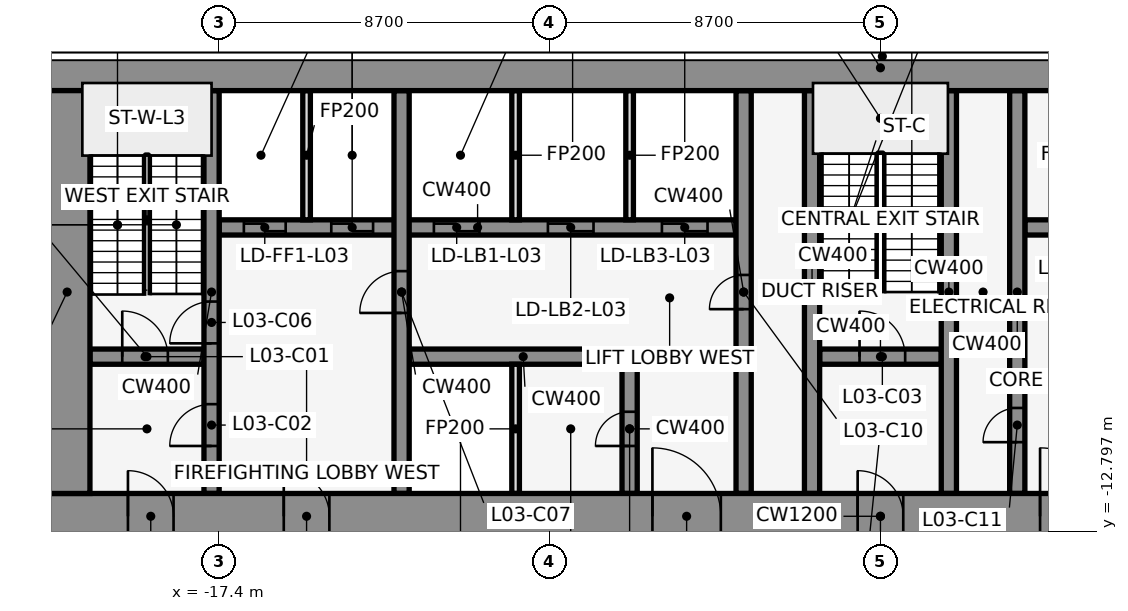
"""IFC4 building model, lengths in metres.
Left out: names, types, materials, properties, quantities, classifications, styles, units other than length and angle.
Written with IfcOpenShell. Run it as: python <this file> out.ifc"""

import sys

from ifc_helpers import new_model, si_unit, direction, frame, frame_2d, origin, place, context, subcontext, project, spatial, rectangle, extrude, element, fill, save


model = new_model("IFC4")
c1 = context("Model", 3, precision=1e-05, world=origin(), true_north=direction((0.0, 1.0)))
c2 = subcontext(c1, "Body", "Model", "MODEL_VIEW")
j1 = project(units=[si_unit("LENGTHUNIT", "METRE"), si_unit("PLANEANGLEUNIT", "RADIAN")], contexts=[c1])
p1 = place(None, origin())
s1 = spatial("IfcSite", under=j1, at=p1, CompositionType="ELEMENT")
p2 = place(p1, origin())
s2 = spatial("IfcBuilding", under=s1, at=p2, CompositionType="ELEMENT")
p3 = place(p2, frame((0.0, 0.0, 20.0)))
s3 = spatial("IfcBuildingStorey", under=s2, at=p3, CompositionType="ELEMENT", Elevation=20.0)
p4 = place(p3, frame((-20.8, -8.2, 0.0), z_axis=(0.0, 0.0, 1.0), x_axis=(1.0, 0.0, 0.0)))
e1 = element("IfcWall", 1, at=p4, inside=s3, PredefinedType="SHEAR", context=c2, shape_type="SweptSolid", body=[
    extrude(rectangle(XDim=3.0, YDim=0.4, at=frame_2d((1.5, 0.0))), origin(), (0.0, 0.0, 1.0), 5.0),
])
p5 = place(p4, frame((0.85, 0.0, 0.0)))
e2 = element("IfcOpeningElement", 2, at=p5, cuts=e1, PredefinedType="OPENING", context=c2, shape_type="SweptSolid", body=[
    extrude(rectangle(XDim=1.2, YDim=2.1, at=frame_2d((0.6, 1.05))), frame((0.0, 0.212, 0.0), z_axis=(0.0, -1.0, 0.0), x_axis=(1.0, 0.0, 0.0)), (0.0, 0.0, 1.0), 0.424),
])
p6 = place(p3, frame((-12.4, -8.2, 0.0), z_axis=(0.0, 0.0, 1.0), x_axis=(1.0, 0.0, 0.0)))
e3 = element("IfcWall", 3, at=p6, inside=s3, PredefinedType="SHEAR", context=c2, shape_type="SweptSolid", body=[
    extrude(rectangle(XDim=6.0, YDim=0.4, at=frame_2d((3.0, 0.0))), origin(), (0.0, 0.0, 1.0), 5.0),
])
p7 = place(p3, frame((-1.6, -8.2, 0.0), z_axis=(0.0, 0.0, 1.0), x_axis=(1.0, 0.0, 0.0)))
e4 = element("IfcWall", 4, at=p7, inside=s3, PredefinedType="SHEAR", context=c2, shape_type="SweptSolid", body=[
    extrude(rectangle(XDim=3.2, YDim=0.4, at=frame_2d((1.6, 0.0))), origin(), (0.0, 0.0, 1.0), 5.0),
])
p8 = place(p7, frame((1.05, 0.0, 0.0)))
e5 = element("IfcOpeningElement", 5, at=p8, cuts=e4, PredefinedType="OPENING", context=c2, shape_type="SweptSolid", body=[
    extrude(rectangle(XDim=1.2, YDim=2.1, at=frame_2d((0.6, 1.05))), frame((0.0, 0.212, 0.0), z_axis=(0.0, -1.0, 0.0), x_axis=(1.0, 0.0, 0.0)), (0.0, 0.0, 1.0), 0.424),
])
p9 = place(p3, frame((-17.4, -4.8, 0.0), z_axis=(0.0, 0.0, 1.0), x_axis=(1.0, 0.0, 0.0)))
e6 = element("IfcWall", 6, at=p9, inside=s3, PredefinedType="SHEAR", context=c2, shape_type="SweptSolid", body=[
    extrude(rectangle(XDim=13.6, YDim=0.4, at=frame_2d((6.8, 0.0))), origin(), (0.0, 0.0, 1.0), 5.0),
])
p10 = place(p9, frame((0.65, 0.0, 0.0)))
e7 = element("IfcOpeningElement", 7, at=p10, cuts=e6, PredefinedType="OPENING", context=c2, shape_type="SweptSolid", body=[
    extrude(rectangle(XDim=1.1, YDim=2.1, at=frame_2d((0.55, 1.05))), frame((0.0, 0.212, 0.0), z_axis=(0.0, -1.0, 0.0), x_axis=(1.0, 0.0, 0.0)), (0.0, 0.0, 1.0), 0.424),
])
p11 = place(p9, frame((2.95, 0.0, 0.0)))
e8 = element("IfcOpeningElement", 8, at=p11, cuts=e6, PredefinedType="OPENING", context=c2, shape_type="SweptSolid", body=[
    extrude(rectangle(XDim=1.1, YDim=2.1, at=frame_2d((0.55, 1.05))), frame((0.0, 0.212, 0.0), z_axis=(0.0, -1.0, 0.0), x_axis=(1.0, 0.0, 0.0)), (0.0, 0.0, 1.0), 0.424),
])
p12 = place(p9, frame((5.65, 0.0, 0.0)))
e9 = element("IfcOpeningElement", 9, at=p12, cuts=e6, PredefinedType="OPENING", context=c2, shape_type="SweptSolid", body=[
    extrude(rectangle(XDim=1.2, YDim=2.1, at=frame_2d((0.6, 1.05))), frame((0.0, 0.212, 0.0), z_axis=(0.0, -1.0, 0.0), x_axis=(1.0, 0.0, 0.0)), (0.0, 0.0, 1.0), 0.424),
])
p13 = place(p9, frame((8.65, 0.0, 0.0)))
e10 = element("IfcOpeningElement", 10, at=p13, cuts=e6, PredefinedType="OPENING", context=c2, shape_type="SweptSolid", body=[
    extrude(rectangle(XDim=1.2, YDim=2.1, at=frame_2d((0.6, 1.05))), frame((0.0, 0.212, 0.0), z_axis=(0.0, -1.0, 0.0), x_axis=(1.0, 0.0, 0.0)), (0.0, 0.0, 1.0), 0.424),
])
p14 = place(p9, frame((11.65, 0.0, 0.0)))
e11 = element("IfcOpeningElement", 11, at=p14, cuts=e6, PredefinedType="OPENING", context=c2, shape_type="SweptSolid", body=[
    extrude(rectangle(XDim=1.2, YDim=2.1, at=frame_2d((0.6, 1.05))), frame((0.0, 0.212, 0.0), z_axis=(0.0, -1.0, 0.0), x_axis=(1.0, 0.0, 0.0)), (0.0, 0.0, 1.0), 0.424),
])
p15 = place(p3, frame((3.8, -4.8, 0.0), z_axis=(0.0, 0.0, 1.0), x_axis=(1.0, 0.0, 0.0)))
e12 = element("IfcWall", 12, at=p15, inside=s3, PredefinedType="SHEAR", context=c2, shape_type="SweptSolid", body=[
    extrude(rectangle(XDim=13.6, YDim=0.4, at=frame_2d((6.8, 0.0))), origin(), (0.0, 0.0, 1.0), 5.0),
])
p16 = place(p15, frame((9.45, 0.0, 0.0)))
e13 = element("IfcOpeningElement", 13, at=p16, cuts=e12, PredefinedType="OPENING", context=c2, shape_type="SweptSolid", body=[
    extrude(rectangle(XDim=1.1, YDim=2.1, at=frame_2d((0.55, 1.05))), frame((0.0, 0.212, 0.0), z_axis=(0.0, -1.0, 0.0), x_axis=(1.0, 0.0, 0.0)), (0.0, 0.0, 1.0), 0.424),
])
p17 = place(p15, frame((11.85, 0.0, 0.0)))
e14 = element("IfcOpeningElement", 14, at=p17, cuts=e12, PredefinedType="OPENING", context=c2, shape_type="SweptSolid", body=[
    extrude(rectangle(XDim=1.1, YDim=2.1, at=frame_2d((0.55, 1.05))), frame((0.0, 0.212, 0.0), z_axis=(0.0, -1.0, 0.0), x_axis=(1.0, 0.0, 0.0)), (0.0, 0.0, 1.0), 0.424),
])
p18 = place(p15, frame((0.95, 0.0, 0.0)))
e15 = element("IfcOpeningElement", 15, at=p18, cuts=e12, PredefinedType="OPENING", context=c2, shape_type="SweptSolid", body=[
    extrude(rectangle(XDim=0.9, YDim=2.1, at=frame_2d((0.45, 1.05))), frame((0.0, 0.212, 0.0), z_axis=(0.0, -1.0, 0.0), x_axis=(1.0, 0.0, 0.0)), (0.0, 0.0, 1.0), 0.424),
])
p19 = place(p15, frame((3.85, 0.0, 0.0)))
e16 = element("IfcOpeningElement", 16, at=p19, cuts=e12, PredefinedType="OPENING", context=c2, shape_type="SweptSolid", body=[
    extrude(rectangle(XDim=0.9, YDim=2.1, at=frame_2d((0.45, 1.05))), frame((0.0, 0.212, 0.0), z_axis=(0.0, -1.0, 0.0), x_axis=(1.0, 0.0, 0.0)), (0.0, 0.0, 1.0), 0.424),
])
p20 = place(p15, frame((6.85, 0.0, 0.0)))
e17 = element("IfcOpeningElement", 17, at=p20, cuts=e12, PredefinedType="OPENING", context=c2, shape_type="SweptSolid", body=[
    extrude(rectangle(XDim=0.9, YDim=2.1, at=frame_2d((0.45, 1.05))), frame((0.0, 0.212, 0.0), z_axis=(0.0, -1.0, 0.0), x_axis=(1.0, 0.0, 0.0)), (0.0, 0.0, 1.0), 0.424),
])
p21 = place(p3, frame((-17.6, -11.8, 0.0), z_axis=(0.0, 0.0, 1.0), x_axis=(0.0, 1.0, 0.0)))
e18 = element("IfcWall", 18, at=p21, inside=s3, PredefinedType="SHEAR", context=c2, shape_type="SweptSolid", body=[
    extrude(rectangle(XDim=10.6, YDim=0.4, at=frame_2d((5.3, 0.0))), origin(), (0.0, 0.0, 1.0), 5.0),
])
p22 = place(p21, frame((1.25, 0.0, 0.0)))
e19 = element("IfcOpeningElement", 19, at=p22, cuts=e18, PredefinedType="OPENING", context=c2, shape_type="SweptSolid", body=[
    extrude(rectangle(XDim=1.1, YDim=2.1, at=frame_2d((0.55, 1.05))), frame((0.0, 0.212, 0.0), z_axis=(0.0, -1.0, 0.0), x_axis=(1.0, 0.0, 0.0)), (0.0, 0.0, 1.0), 0.424),
])
p23 = place(p21, frame((3.95, 0.0, 0.0)))
e20 = element("IfcOpeningElement", 20, at=p23, cuts=e18, PredefinedType="OPENING", context=c2, shape_type="SweptSolid", body=[
    extrude(rectangle(XDim=1.1, YDim=2.1, at=frame_2d((0.55, 1.05))), frame((0.0, 0.212, 0.0), z_axis=(0.0, -1.0, 0.0), x_axis=(1.0, 0.0, 0.0)), (0.0, 0.0, 1.0), 0.424),
])
p24 = place(p3, frame((-15.1, -4.6, 0.0), z_axis=(0.0, 0.0, 1.0), x_axis=(0.0, 1.0, 0.0)))
e21 = element("IfcWall", 21, at=p24, inside=s3, PredefinedType="PARTITIONING", context=c2, shape_type="SweptSolid", body=[
    extrude(rectangle(XDim=3.4, YDim=0.2, at=frame_2d((1.7, 0.0))), origin(), (0.0, 0.0, 1.0), 4.7),
])
p25 = place(p3, frame((-12.6, -11.8, 0.0), z_axis=(0.0, 0.0, 1.0), x_axis=(0.0, 1.0, 0.0)))
e22 = element("IfcWall", 22, at=p25, inside=s3, PredefinedType="SHEAR", context=c2, shape_type="SweptSolid", body=[
    extrude(rectangle(XDim=10.6, YDim=0.4, at=frame_2d((5.3, 0.0))), origin(), (0.0, 0.0, 1.0), 5.0),
])
p26 = place(p25, frame((4.75, 0.0, 0.0)))
e23 = element("IfcOpeningElement", 23, at=p26, cuts=e22, PredefinedType="OPENING", context=c2, shape_type="SweptSolid", body=[
    extrude(rectangle(XDim=1.1, YDim=2.1, at=frame_2d((0.55, 1.05))), frame((0.0, 0.212, 0.0), z_axis=(0.0, -1.0, 0.0), x_axis=(1.0, 0.0, 0.0)), (0.0, 0.0, 1.0), 0.424),
])
for number, where, z_axis, x_axis in (
    (24, (-9.6, -11.8, 0.0), (0.0, 0.0, 1.0), (0.0, 1.0, 0.0)),
    (25, (-9.6, -4.6, 0.0), (0.0, 0.0, 1.0), (0.0, 1.0, 0.0)),
):
    element("IfcWall", number, at=place(p3, frame(where, z_axis=z_axis, x_axis=x_axis)), inside=s3, PredefinedType="PARTITIONING", context=c2, shape_type="SweptSolid", body=[
        extrude(rectangle(XDim=3.4, YDim=0.2, at=frame_2d((1.7, 0.0))), origin(), (0.0, 0.0, 1.0), 4.7),
    ])
p27 = place(p3, frame((-6.6, -11.8, 0.0), z_axis=(0.0, 0.0, 1.0), x_axis=(0.0, 1.0, 0.0)))
e26 = element("IfcWall", 26, at=p27, inside=s3, PredefinedType="SHEAR", context=c2, shape_type="SweptSolid", body=[
    extrude(rectangle(XDim=3.4, YDim=0.4, at=frame_2d((1.7, 0.0))), origin(), (0.0, 0.0, 1.0), 5.0),
])
p28 = place(p27, frame((1.25, 0.0, 0.0)))
e27 = element("IfcOpeningElement", 27, at=p28, cuts=e26, PredefinedType="OPENING", context=c2, shape_type="SweptSolid", body=[
    extrude(rectangle(XDim=0.9, YDim=2.1, at=frame_2d((0.45, 1.05))), frame((0.0, 0.212, 0.0), z_axis=(0.0, -1.0, 0.0), x_axis=(1.0, 0.0, 0.0)), (0.0, 0.0, 1.0), 0.424),
])
p29 = place(p3, frame((-6.6, -4.6, 0.0), z_axis=(0.0, 0.0, 1.0), x_axis=(0.0, 1.0, 0.0)))
e28 = element("IfcWall", 28, at=p29, inside=s3, PredefinedType="PARTITIONING", context=c2, shape_type="SweptSolid", body=[
    extrude(rectangle(XDim=3.4, YDim=0.2, at=frame_2d((1.7, 0.0))), origin(), (0.0, 0.0, 1.0), 4.7),
])
p30 = place(p3, frame((-3.6, -11.8, 0.0), z_axis=(0.0, 0.0, 1.0), x_axis=(0.0, 1.0, 0.0)))
e29 = element("IfcWall", 29, at=p30, inside=s3, PredefinedType="SHEAR", context=c2, shape_type="SweptSolid", body=[
    extrude(rectangle(XDim=10.6, YDim=0.4, at=frame_2d((5.3, 0.0))), origin(), (0.0, 0.0, 1.0), 5.0),
])
p31 = place(p30, frame((4.85, 0.0, 0.0)))
e30 = element("IfcOpeningElement", 30, at=p31, cuts=e29, PredefinedType="OPENING", context=c2, shape_type="SweptSolid", body=[
    extrude(rectangle(XDim=0.9, YDim=2.1, at=frame_2d((0.45, 1.05))), frame((0.0, 0.212, 0.0), z_axis=(0.0, -1.0, 0.0), x_axis=(1.0, 0.0, 0.0)), (0.0, 0.0, 1.0), 0.424),
])
for number, where, z_axis, x_axis in (
    (31, (-1.8, -11.8, 0.0), (0.0, 0.0, 1.0), (0.0, 1.0, 0.0)),
    (32, (1.8, -11.8, 0.0), (0.0, 0.0, 1.0), (0.0, 1.0, 0.0)),
):
    element("IfcWall", number, at=place(p3, frame(where, z_axis=z_axis, x_axis=x_axis)), inside=s3, PredefinedType="SHEAR", context=c2, shape_type="SweptSolid", body=[
        extrude(rectangle(XDim=10.6, YDim=0.4, at=frame_2d((5.3, 0.0))), origin(), (0.0, 0.0, 1.0), 5.0),
    ])
p32 = place(p3, frame((3.6, -11.8, 0.0), z_axis=(0.0, 0.0, 1.0), x_axis=(0.0, 1.0, 0.0)))
e33 = element("IfcWall", 33, at=p32, inside=s3, PredefinedType="SHEAR", context=c2, shape_type="SweptSolid", body=[
    extrude(rectangle(XDim=10.6, YDim=0.4, at=frame_2d((5.3, 0.0))), origin(), (0.0, 0.0, 1.0), 5.0),
])
p33 = place(p32, frame((1.35, 0.0, 0.0)))
e34 = element("IfcOpeningElement", 34, at=p33, cuts=e33, PredefinedType="OPENING", context=c2, shape_type="SweptSolid", body=[
    extrude(rectangle(XDim=0.9, YDim=2.1, at=frame_2d((0.45, 1.05))), frame((0.0, 0.212, 0.0), z_axis=(0.0, -1.0, 0.0), x_axis=(1.0, 0.0, 0.0)), (0.0, 0.0, 1.0), 0.424),
])
p34 = place(p3, frame((-22.0, -0.6, 0.0), z_axis=(0.0, 0.0, 1.0), x_axis=(1.0, 0.0, 0.0)))
e35 = element("IfcWall", 35, at=p34, inside=s3, PredefinedType="SHEAR", context=c2, shape_type="SweptSolid", body=[
    extrude(rectangle(XDim=44.0, YDim=1.2, at=frame_2d((22.0, 0.0))), origin(), (0.0, 0.0, 1.0), 5.0),
])
p35 = place(p3, frame((-22.0, -12.4, 0.0), z_axis=(0.0, 0.0, 1.0), x_axis=(1.0, 0.0, 0.0)))
e36 = element("IfcWall", 36, at=p35, inside=s3, PredefinedType="SHEAR", context=c2, shape_type="SweptSolid", body=[
    extrude(rectangle(XDim=44.0, YDim=1.2, at=frame_2d((22.0, 0.0))), origin(), (0.0, 0.0, 1.0), 5.0),
])
p36 = place(p35, frame((2.2, 0.0, 0.0)))
e37 = element("IfcOpeningElement", 37, at=p36, cuts=e36, PredefinedType="OPENING", context=c2, shape_type="SweptSolid", body=[
    extrude(rectangle(XDim=1.2, YDim=2.1, at=frame_2d((0.6, 1.05))), frame((0.0, 0.612, 0.0), z_axis=(0.0, -1.0, 0.0), x_axis=(1.0, 0.0, 0.0)), (0.0, 0.0, 1.0), 1.224),
])
p37 = place(p35, frame((21.4, 0.0, 0.0)))
e38 = element("IfcOpeningElement", 38, at=p37, cuts=e36, PredefinedType="OPENING", context=c2, shape_type="SweptSolid", body=[
    extrude(rectangle(XDim=1.2, YDim=2.1, at=frame_2d((0.6, 1.05))), frame((0.0, 0.612, 0.0), z_axis=(0.0, -1.0, 0.0), x_axis=(1.0, 0.0, 0.0)), (0.0, 0.0, 1.0), 1.224),
])
p38 = place(p35, frame((40.6, 0.0, 0.0)))
e39 = element("IfcOpeningElement", 39, at=p38, cuts=e36, PredefinedType="OPENING", context=c2, shape_type="SweptSolid", body=[
    extrude(rectangle(XDim=1.2, YDim=2.1, at=frame_2d((0.6, 1.05))), frame((0.0, 0.612, 0.0), z_axis=(0.0, -1.0, 0.0), x_axis=(1.0, 0.0, 0.0)), (0.0, 0.0, 1.0), 1.224),
])
p39 = place(p35, frame((16.0, 0.0, 0.0)))
e40 = element("IfcOpeningElement", 40, at=p39, cuts=e36, PredefinedType="OPENING", context=c2, shape_type="SweptSolid", body=[
    extrude(rectangle(XDim=1.8, YDim=2.1, at=frame_2d((0.9, 1.05))), frame((0.0, 0.612, 0.0), z_axis=(0.0, -1.0, 0.0), x_axis=(1.0, 0.0, 0.0)), (0.0, 0.0, 1.0), 1.224),
])
p40 = place(p35, frame((6.3, 0.0, 0.0)))
e41 = element("IfcOpeningElement", 41, at=p40, cuts=e36, PredefinedType="OPENING", context=c2, shape_type="SweptSolid", body=[
    extrude(rectangle(XDim=1.2, YDim=2.1, at=frame_2d((0.6, 1.05))), frame((0.0, 0.612, 0.0), z_axis=(0.0, -1.0, 0.0), x_axis=(1.0, 0.0, 0.0)), (0.0, 0.0, 1.0), 1.224),
])
p41 = place(p35, frame((26.2, 0.0, 0.0)))
e42 = element("IfcOpeningElement", 42, at=p41, cuts=e36, PredefinedType="OPENING", context=c2, shape_type="SweptSolid", body=[
    extrude(rectangle(XDim=1.8, YDim=2.1, at=frame_2d((0.9, 1.05))), frame((0.0, 0.612, 0.0), z_axis=(0.0, -1.0, 0.0), x_axis=(1.0, 0.0, 0.0)), (0.0, 0.0, 1.0), 1.224),
])
p42 = place(p35, frame((36.5, 0.0, 0.0)))
e43 = element("IfcOpeningElement", 43, at=p42, cuts=e36, PredefinedType="OPENING", context=c2, shape_type="SweptSolid", body=[
    extrude(rectangle(XDim=1.2, YDim=2.1, at=frame_2d((0.6, 1.05))), frame((0.0, 0.612, 0.0), z_axis=(0.0, -1.0, 0.0), x_axis=(1.0, 0.0, 0.0)), (0.0, 0.0, 1.0), 1.224),
])
p43 = place(p3, frame((-21.4, -11.8, 0.0), z_axis=(0.0, 0.0, 1.0), x_axis=(0.0, 1.0, 0.0)))
e44 = element("IfcWall", 44, at=p43, inside=s3, PredefinedType="SHEAR", context=c2, shape_type="SweptSolid", body=[
    extrude(rectangle(XDim=10.6, YDim=1.2, at=frame_2d((5.3, 0.0))), origin(), (0.0, 0.0, 1.0), 5.0),
])
p44 = place(p5, origin())
e45 = element("IfcDoor", 45, at=p44, inside=s3, OperationType="SINGLE_SWING_LEFT", PredefinedType="DOOR", context=c2, shape_type="SweptSolid", body=[
    extrude(rectangle(XDim=1.2, YDim=2.1, at=frame_2d((0.6, 1.05))), frame((0.0, 0.025, 0.0), z_axis=(0.0, -1.0, 0.0), x_axis=(1.0, 0.0, 0.0)), (0.0, 0.0, 1.0), 0.05),
])
fill(e2, e45)
p45 = place(p22, frame((1.1, 0.0, 0.0), z_axis=(0.0, 0.0, 1.0), x_axis=(-1.0, 0.0, 0.0)))
e46 = element("IfcDoor", 46, at=p45, inside=s3, OperationType="SINGLE_SWING_LEFT", PredefinedType="DOOR", context=c2, shape_type="SweptSolid", body=[
    extrude(rectangle(XDim=1.1, YDim=2.1, at=frame_2d((0.55, 1.05))), frame((0.0, 0.025, 0.0), z_axis=(0.0, -1.0, 0.0), x_axis=(1.0, 0.0, 0.0)), (0.0, 0.0, 1.0), 0.05),
])
fill(e19, e46)
p46 = place(p8, origin())
e47 = element("IfcDoor", 47, at=p46, inside=s3, OperationType="SINGLE_SWING_LEFT", PredefinedType="DOOR", context=c2, shape_type="SweptSolid", body=[
    extrude(rectangle(XDim=1.2, YDim=2.1, at=frame_2d((0.6, 1.05))), frame((0.0, 0.025, 0.0), z_axis=(0.0, -1.0, 0.0), x_axis=(1.0, 0.0, 0.0)), (0.0, 0.0, 1.0), 0.05),
])
fill(e5, e47)
p47 = place(p10, origin())
e48 = element("IfcDoor", 48, at=p47, inside=s3, OperationType="DOUBLE_DOOR_SLIDING", PredefinedType="DOOR", context=c2, shape_type="SweptSolid", body=[
    extrude(rectangle(XDim=1.1, YDim=2.1, at=frame_2d((0.55, 1.05))), frame((0.0, 0.025, 0.0), z_axis=(0.0, -1.0, 0.0), x_axis=(1.0, 0.0, 0.0)), (0.0, 0.0, 1.0), 0.05),
])
fill(e7, e48)
p48 = place(p11, origin())
e49 = element("IfcDoor", 49, at=p48, inside=s3, OperationType="DOUBLE_DOOR_SLIDING", PredefinedType="DOOR", context=c2, shape_type="SweptSolid", body=[
    extrude(rectangle(XDim=1.1, YDim=2.1, at=frame_2d((0.55, 1.05))), frame((0.0, 0.025, 0.0), z_axis=(0.0, -1.0, 0.0), x_axis=(1.0, 0.0, 0.0)), (0.0, 0.0, 1.0), 0.05),
])
fill(e8, e49)
p49 = place(p12, origin())
e50 = element("IfcDoor", 50, at=p49, inside=s3, OperationType="DOUBLE_DOOR_SLIDING", PredefinedType="DOOR", context=c2, shape_type="SweptSolid", body=[
    extrude(rectangle(XDim=1.2, YDim=2.1, at=frame_2d((0.6, 1.05))), frame((0.0, 0.025, 0.0), z_axis=(0.0, -1.0, 0.0), x_axis=(1.0, 0.0, 0.0)), (0.0, 0.0, 1.0), 0.05),
])
fill(e9, e50)
p50 = place(p13, origin())
e51 = element("IfcDoor", 51, at=p50, inside=s3, OperationType="DOUBLE_DOOR_SLIDING", PredefinedType="DOOR", context=c2, shape_type="SweptSolid", body=[
    extrude(rectangle(XDim=1.2, YDim=2.1, at=frame_2d((0.6, 1.05))), frame((0.0, 0.025, 0.0), z_axis=(0.0, -1.0, 0.0), x_axis=(1.0, 0.0, 0.0)), (0.0, 0.0, 1.0), 0.05),
])
fill(e10, e51)
p51 = place(p14, origin())
e52 = element("IfcDoor", 52, at=p51, inside=s3, OperationType="DOUBLE_DOOR_SLIDING", PredefinedType="DOOR", context=c2, shape_type="SweptSolid", body=[
    extrude(rectangle(XDim=1.2, YDim=2.1, at=frame_2d((0.6, 1.05))), frame((0.0, 0.025, 0.0), z_axis=(0.0, -1.0, 0.0), x_axis=(1.0, 0.0, 0.0)), (0.0, 0.0, 1.0), 0.05),
])
fill(e11, e52)
p52 = place(p23, frame((1.1, 0.0, 0.0), z_axis=(0.0, 0.0, 1.0), x_axis=(-1.0, 0.0, 0.0)))
e53 = element("IfcDoor", 53, at=p52, inside=s3, OperationType="SINGLE_SWING_LEFT", PredefinedType="DOOR", context=c2, shape_type="SweptSolid", body=[
    extrude(rectangle(XDim=1.1, YDim=2.1, at=frame_2d((0.55, 1.05))), frame((0.0, 0.025, 0.0), z_axis=(0.0, -1.0, 0.0), x_axis=(1.0, 0.0, 0.0)), (0.0, 0.0, 1.0), 0.05),
])
fill(e20, e53)
p53 = place(p26, origin())
e54 = element("IfcDoor", 54, at=p53, inside=s3, OperationType="SINGLE_SWING_LEFT", PredefinedType="DOOR", context=c2, shape_type="SweptSolid", body=[
    extrude(rectangle(XDim=1.1, YDim=2.1, at=frame_2d((0.55, 1.05))), frame((0.0, 0.025, 0.0), z_axis=(0.0, -1.0, 0.0), x_axis=(1.0, 0.0, 0.0)), (0.0, 0.0, 1.0), 0.05),
])
fill(e23, e54)
p54 = place(p31, frame((0.9, 0.0, 0.0), z_axis=(0.0, 0.0, 1.0), x_axis=(-1.0, 0.0, 0.0)))
e55 = element("IfcDoor", 55, at=p54, inside=s3, OperationType="SINGLE_SWING_LEFT", PredefinedType="DOOR", context=c2, shape_type="SweptSolid", body=[
    extrude(rectangle(XDim=0.9, YDim=2.1, at=frame_2d((0.45, 1.05))), frame((0.0, 0.025, 0.0), z_axis=(0.0, -1.0, 0.0), x_axis=(1.0, 0.0, 0.0)), (0.0, 0.0, 1.0), 0.05),
])
fill(e30, e55)
p55 = place(p33, origin())
e56 = element("IfcDoor", 56, at=p55, inside=s3, OperationType="SINGLE_SWING_LEFT", PredefinedType="DOOR", context=c2, shape_type="SweptSolid", body=[
    extrude(rectangle(XDim=0.9, YDim=2.1, at=frame_2d((0.45, 1.05))), frame((0.0, 0.025, 0.0), z_axis=(0.0, -1.0, 0.0), x_axis=(1.0, 0.0, 0.0)), (0.0, 0.0, 1.0), 0.05),
])
fill(e34, e56)
p56 = place(p28, origin())
e57 = element("IfcDoor", 57, at=p56, inside=s3, OperationType="SINGLE_SWING_LEFT", PredefinedType="DOOR", context=c2, shape_type="SweptSolid", body=[
    extrude(rectangle(XDim=0.9, YDim=2.1, at=frame_2d((0.45, 1.05))), frame((0.0, 0.025, 0.0), z_axis=(0.0, -1.0, 0.0), x_axis=(1.0, 0.0, 0.0)), (0.0, 0.0, 1.0), 0.05),
])
fill(e27, e57)
p57 = place(p36, frame((1.2, 0.0, 0.0), z_axis=(0.0, 0.0, 1.0), x_axis=(-1.0, 0.0, 0.0)))
e58 = element("IfcDoor", 58, at=p57, inside=s3, OperationType="SINGLE_SWING_RIGHT", PredefinedType="DOOR", context=c2, shape_type="SweptSolid", body=[
    extrude(rectangle(XDim=1.2, YDim=2.1, at=frame_2d((0.6, 1.05))), frame((0.0, 0.025, 0.0), z_axis=(0.0, -1.0, 0.0), x_axis=(1.0, 0.0, 0.0)), (0.0, 0.0, 1.0), 0.05),
])
fill(e37, e58)
p58 = place(p37, frame((1.2, 0.0, 0.0), z_axis=(0.0, 0.0, 1.0), x_axis=(-1.0, 0.0, 0.0)))
e59 = element("IfcDoor", 59, at=p58, inside=s3, OperationType="SINGLE_SWING_RIGHT", PredefinedType="DOOR", context=c2, shape_type="SweptSolid", body=[
    extrude(rectangle(XDim=1.2, YDim=2.1, at=frame_2d((0.6, 1.05))), frame((0.0, 0.025, 0.0), z_axis=(0.0, -1.0, 0.0), x_axis=(1.0, 0.0, 0.0)), (0.0, 0.0, 1.0), 0.05),
])
fill(e38, e59)
p59 = place(p39, origin())
e60 = element("IfcDoor", 60, at=p59, inside=s3, OperationType="SINGLE_SWING_LEFT", PredefinedType="DOOR", context=c2, shape_type="SweptSolid", body=[
    extrude(rectangle(XDim=1.8, YDim=2.1, at=frame_2d((0.9, 1.05))), frame((0.0, 0.025, 0.0), z_axis=(0.0, -1.0, 0.0), x_axis=(1.0, 0.0, 0.0)), (0.0, 0.0, 1.0), 0.05),
])
fill(e40, e60)
p60 = place(p40, frame((1.2, 0.0, 0.0), z_axis=(0.0, 0.0, 1.0), x_axis=(-1.0, 0.0, 0.0)))
e61 = element("IfcDoor", 61, at=p60, inside=s3, OperationType="SINGLE_SWING_RIGHT", PredefinedType="DOOR", context=c2, shape_type="SweptSolid", body=[
    extrude(rectangle(XDim=1.2, YDim=2.1, at=frame_2d((0.6, 1.05))), frame((0.0, 0.025, 0.0), z_axis=(0.0, -1.0, 0.0), x_axis=(1.0, 0.0, 0.0)), (0.0, 0.0, 1.0), 0.05),
])
fill(e41, e61)
p61 = place(p41, origin())
e62 = element("IfcDoor", 62, at=p61, inside=s3, OperationType="SINGLE_SWING_LEFT", PredefinedType="DOOR", context=c2, shape_type="SweptSolid", body=[
    extrude(rectangle(XDim=1.8, YDim=2.1, at=frame_2d((0.9, 1.05))), frame((0.0, 0.025, 0.0), z_axis=(0.0, -1.0, 0.0), x_axis=(1.0, 0.0, 0.0)), (0.0, 0.0, 1.0), 0.05),
])
fill(e42, e62)
save(model, sys.argv[1])
